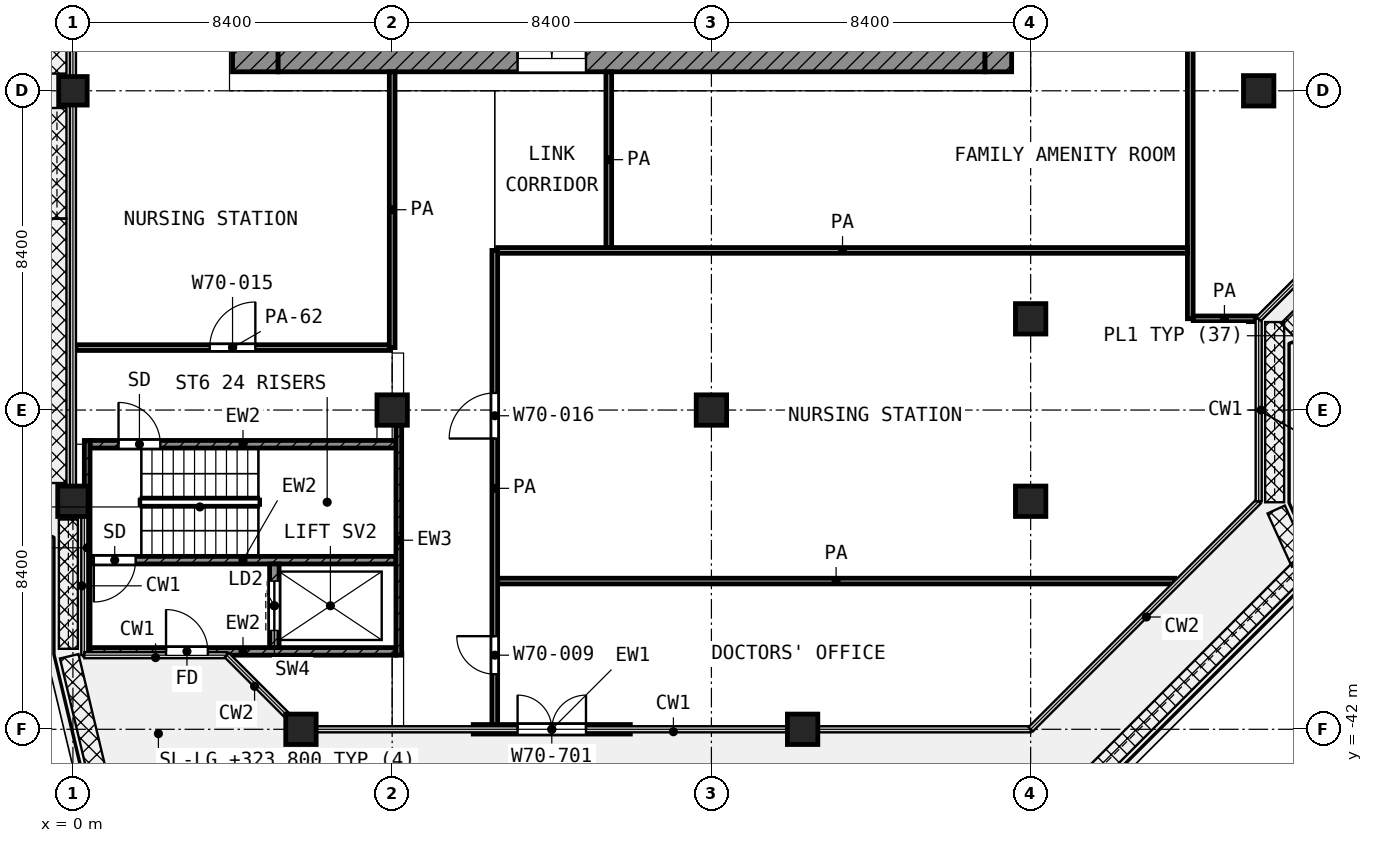
"""IFC4 building model, lengths in metres.
Left out: names, types, materials, properties, quantities, classifications, styles, units other than length and angle.
Written with IfcOpenShell. Run it as: python <this file> out.ifc"""

import sys

from ifc_helpers import new_model, si_unit, direction, frame, frame_2d, origin, origin_2d, place, context, subcontext, project, spatial, rectangle, extrude, element, fill, save


model = new_model("IFC4")
c1 = context("Model", 3, precision=1e-05, world=origin(), true_north=direction((0.0, 1.0)))
c2 = subcontext(c1, "Body", "Model", "MODEL_VIEW")
j1 = project(units=[si_unit("LENGTHUNIT", "METRE"), si_unit("PLANEANGLEUNIT", "RADIAN")], contexts=[c1])
p1 = place(None, origin())
s1 = spatial("IfcSite", under=j1, at=p1, CompositionType="ELEMENT")
p2 = place(p1, origin())
s2 = spatial("IfcBuilding", under=s1, at=p2, CompositionType="ELEMENT")
p3 = place(p2, frame((0.0, 0.0, 323.8)))
s3 = spatial("IfcBuildingStorey", under=s2, at=p3, CompositionType="ELEMENT", Elevation=323.8)
p4 = place(p3, frame((0.0, -25.2, 0.0), z_axis=(0.0, 0.0, 1.0), x_axis=(1.0, 0.0, 0.0)))
e1 = element("IfcColumn", 1, at=p4, inside=s3, PredefinedType="COLUMN", context=c2, shape_type="SweptSolid", body=[
    extrude(rectangle(XDim=0.75, YDim=0.75, at=origin_2d()), origin(), (0.0, 0.0, 1.0), 4.2),
])
for number, where, z_axis, x_axis in (
    (2, (31.2, -25.2, 0.0), (0.0, 0.0, 1.0), (1.0, 0.0, 0.0)),
    (3, (25.2, -31.2, 0.0), (0.0, 0.0, 1.0), (1.0, 0.0, 0.0)),
    (4, (8.4, -33.6, 0.0), (0.0, 0.0, 1.0), (1.0, 0.0, 0.0)),
    (5, (16.8, -33.6, 0.0), (0.0, 0.0, 1.0), (1.0, 0.0, 0.0)),
    (6, (0.0, -36.0, 0.0), (0.0, 0.0, 1.0), (1.0, 0.0, 0.0)),
    (7, (25.2, -36.0, 0.0), (0.0, 0.0, 1.0), (1.0, 0.0, 0.0)),
    (8, (6.0, -42.0, 0.0), (0.0, 0.0, 1.0), (1.0, 0.0, 0.0)),
    (9, (19.2, -42.0, 0.0), (0.0, 0.0, 1.0), (1.0, 0.0, 0.0)),
):
    element("IfcColumn", number, at=place(p3, frame(where, z_axis=z_axis, x_axis=x_axis)), inside=s3, PredefinedType="COLUMN", context=c2, shape_type="SweptSolid", body=[
        extrude(rectangle(XDim=0.8, YDim=0.8, at=origin_2d()), origin(), (0.0, 0.0, 1.0), 4.2),
    ])
p5 = place(p3, frame((10.533, -42.0, 0.0), z_axis=(0.0, 0.0, 1.0), x_axis=(1.0, 0.0, 0.0)))
e10 = element("IfcWall", 10, at=p5, inside=s3, PredefinedType="SOLIDWALL", context=c2, shape_type="SweptSolid", body=[
    extrude(rectangle(XDim=4.133, YDim=0.25, at=frame_2d((2.067, 0.0))), origin(), (0.0, 0.0, 1.0), 3.48),
])
p6 = place(p5, frame((1.167, 0.0, 0.0)))
e11 = element("IfcOpeningElement", 11, at=p6, cuts=e10, PredefinedType="OPENING", context=c2, shape_type="SweptSolid", body=[
    extrude(rectangle(XDim=1.8, YDim=2.1, at=frame_2d((0.9, 1.05))), frame((0.0, 0.135, 0.0), z_axis=(0.0, -1.0, 0.0), x_axis=(1.0, 0.0, 0.0)), (0.0, 0.0, 1.0), 0.27),
])
p7 = place(p3, frame((4.8, -24.7, 0.0), z_axis=(0.0, 0.0, 1.0), x_axis=(0.0, 1.0, 0.0)))
e12 = element("IfcWall", 12, at=p7, inside=s3, PredefinedType="SHEAR", context=c2, shape_type="SweptSolid", body=[
    extrude(rectangle(XDim=19.3, YDim=1.2, at=frame_2d((9.65, 0.0))), origin(), (0.0, 0.0, 1.0), 3.6),
])
p8 = place(p7, frame((11.15, 0.0, 0.0)))
e13 = element("IfcOpeningElement", 13, at=p8, cuts=e12, PredefinedType="OPENING", context=c2, shape_type="SweptSolid", body=[
    extrude(rectangle(XDim=1.1, YDim=2.1, at=frame_2d((0.55, 1.05))), frame((0.0, 0.61, 0.0), z_axis=(0.0, -1.0, 0.0), x_axis=(1.0, 0.0, 0.0)), (0.0, 0.0, 1.0), 1.22),
])
p9 = place(p7, frame((1.85, 0.0, 0.0)))
e14 = element("IfcOpeningElement", 14, at=p9, cuts=e12, PredefinedType="OPENING", context=c2, shape_type="SweptSolid", body=[
    extrude(rectangle(XDim=1.1, YDim=2.1, at=frame_2d((0.55, 1.05))), frame((0.0, 0.61, 0.0), z_axis=(0.0, -1.0, 0.0), x_axis=(1.0, 0.0, 0.0)), (0.0, 0.0, 1.0), 1.22),
])
p10 = place(p3, frame((5.4, -24.35, 0.0), z_axis=(0.0, 0.0, 1.0), x_axis=(1.0, 0.0, 0.0)))
e15 = element("IfcWall", 15, at=p10, inside=s3, PredefinedType="SHEAR", context=c2, shape_type="SweptSolid", body=[
    extrude(rectangle(XDim=18.6, YDim=0.7, at=frame_2d((9.3, 0.0))), origin(), (0.0, 0.0, 1.0), 3.6),
])
p11 = place(p10, frame((6.3, 0.0, 0.0)))
e16 = element("IfcOpeningElement", 16, at=p11, cuts=e15, PredefinedType="OPENING", context=c2, shape_type="SweptSolid", body=[
    extrude(rectangle(XDim=1.8, YDim=2.1, at=frame_2d((0.9, 1.05))), frame((0.0, 0.36, 0.0), z_axis=(0.0, -1.0, 0.0), x_axis=(1.0, 0.0, 0.0)), (0.0, 0.0, 1.0), 0.72),
])
p12 = place(p3, frame((24.35, -24.7, 0.0), z_axis=(0.0, 0.0, 1.0), x_axis=(0.0, 1.0, 0.0)))
e17 = element("IfcWall", 17, at=p12, inside=s3, PredefinedType="SHEAR", context=c2, shape_type="SweptSolid", body=[
    extrude(rectangle(XDim=0.7, YDim=0.7, at=frame_2d((0.35, 0.0))), origin(), (0.0, 0.0, 1.0), 3.6),
])
p13 = place(p3, frame((0.375, -40.05, 0.0), z_axis=(0.0, 0.0, 1.0), x_axis=(0.0, 1.0, 0.0)))
e18 = element("IfcWall", 18, at=p13, inside=s3, PredefinedType="SHEAR", context=c2, shape_type="SweptSolid", body=[
    extrude(rectangle(XDim=5.65, YDim=0.15, at=frame_2d((2.825, 0.0))), origin(), (0.0, 0.0, 1.0), 3.6),
])
p14 = place(p3, frame((8.575, -40.05, 0.0), z_axis=(0.0, 0.0, 1.0), x_axis=(0.0, 1.0, 0.0)))
e19 = element("IfcWall", 19, at=p14, inside=s3, PredefinedType="SHEAR", context=c2, shape_type="SweptSolid", body=[
    extrude(rectangle(XDim=6.05, YDim=0.15, at=frame_2d((3.025, 0.0))), origin(), (0.0, 0.0, 1.0), 3.6),
])
p15 = place(p3, frame((0.45, -34.5, 0.0), z_axis=(0.0, 0.0, 1.0), x_axis=(1.0, 0.0, 0.0)))
e20 = element("IfcWall", 20, at=p15, inside=s3, PredefinedType="SHEAR", context=c2, shape_type="SweptSolid", body=[
    extrude(rectangle(XDim=8.05, YDim=0.2, at=frame_2d((4.025, 0.0))), origin(), (0.0, 0.0, 1.0), 3.6),
])
p16 = place(p15, frame((0.75, 0.0, 0.0)))
e21 = element("IfcOpeningElement", 21, at=p16, cuts=e20, PredefinedType="OPENING", context=c2, shape_type="SweptSolid", body=[
    extrude(rectangle(XDim=1.1, YDim=2.1, at=frame_2d((0.55, 1.05))), frame((0.0, 0.11, 0.0), z_axis=(0.0, -1.0, 0.0), x_axis=(1.0, 0.0, 0.0)), (0.0, 0.0, 1.0), 0.22),
])
p17 = place(p3, frame((0.45, -37.55, 0.0), z_axis=(0.0, 0.0, 1.0), x_axis=(1.0, 0.0, 0.0)))
e22 = element("IfcWall", 22, at=p17, inside=s3, PredefinedType="SHEAR", context=c2, shape_type="SweptSolid", body=[
    extrude(rectangle(XDim=8.05, YDim=0.2, at=frame_2d((4.025, 0.0))), origin(), (0.0, 0.0, 1.0), 3.6),
])
p18 = place(p17, frame((0.1, 0.0, 0.0)))
e23 = element("IfcOpeningElement", 23, at=p18, cuts=e22, PredefinedType="OPENING", context=c2, shape_type="SweptSolid", body=[
    extrude(rectangle(XDim=1.1, YDim=2.1, at=frame_2d((0.55, 1.05))), frame((0.0, 0.11, 0.0), z_axis=(0.0, -1.0, 0.0), x_axis=(1.0, 0.0, 0.0)), (0.0, 0.0, 1.0), 0.22),
])
p19 = place(p3, frame((0.45, -39.95, 0.0), z_axis=(0.0, 0.0, 1.0), x_axis=(1.0, 0.0, 0.0)))
e24 = element("IfcWall", 24, at=p19, inside=s3, PredefinedType="SHEAR", context=c2, shape_type="SweptSolid", body=[
    extrude(rectangle(XDim=8.05, YDim=0.2, at=frame_2d((4.025, 0.0))), origin(), (0.0, 0.0, 1.0), 3.6),
])
p20 = place(p19, frame((2.0, 0.0, 0.0)))
e25 = element("IfcOpeningElement", 25, at=p20, cuts=e24, PredefinedType="OPENING", context=c2, shape_type="SweptSolid", body=[
    extrude(rectangle(XDim=1.1, YDim=2.1, at=frame_2d((0.55, 1.05))), frame((0.0, 0.11, 0.0), z_axis=(0.0, -1.0, 0.0), x_axis=(1.0, 0.0, 0.0)), (0.0, 0.0, 1.0), 0.22),
])
p21 = place(p3, frame((5.3, -39.85, 0.0), z_axis=(0.0, 0.0, 1.0), x_axis=(0.0, 1.0, 0.0)))
e26 = element("IfcWall", 26, at=p21, inside=s3, PredefinedType="SHEAR", context=c2, shape_type="SweptSolid", body=[
    extrude(rectangle(XDim=2.2, YDim=0.25, at=frame_2d((1.1, 0.0))), origin(), (0.0, 0.0, 1.0), 3.6),
])
p22 = place(p21, frame((0.45, 0.0, 0.0)))
e27 = element("IfcOpeningElement", 27, at=p22, cuts=e26, PredefinedType="OPENING", context=c2, shape_type="SweptSolid", body=[
    extrude(rectangle(XDim=1.3, YDim=2.1, at=frame_2d((0.65, 1.05))), frame((0.0, 0.135, 0.0), z_axis=(0.0, -1.0, 0.0), x_axis=(1.0, 0.0, 0.0)), (0.0, 0.0, 1.0), 0.27),
])
p23 = place(p3, frame((11.175, -38.1, 0.0), z_axis=(0.0, 0.0, 1.0), x_axis=(1.0, 0.0, 0.0)))
e28 = element("IfcWall", 28, at=p23, inside=s3, PredefinedType="PARTITIONING", context=c2, shape_type="SweptSolid", body=[
    extrude(rectangle(XDim=17.812, YDim=0.15, at=frame_2d((8.906, 0.0))), origin(), (0.0, 0.0, 1.0), 3.6),
])
p24 = place(p3, frame((0.08, -31.957, 0.0), z_axis=(0.0, 0.0, 1.0), x_axis=(1.0, 0.0, 0.0)))
e29 = element("IfcWall", 29, at=p24, inside=s3, PredefinedType="PARTITIONING", context=c2, shape_type="SweptSolid", body=[
    extrude(rectangle(XDim=8.245, YDim=0.15, at=frame_2d((4.123, 0.0))), origin(), (0.0, 0.0, 1.0), 2.7),
])
p25 = place(p24, frame((3.52, 0.0, 0.0)))
e30 = element("IfcOpeningElement", 30, at=p25, cuts=e29, PredefinedType="OPENING", context=c2, shape_type="SweptSolid", body=[
    extrude(rectangle(XDim=1.2, YDim=2.1, at=frame_2d((0.6, 1.05))), frame((0.0, 0.085, 0.0), z_axis=(0.0, -1.0, 0.0), x_axis=(1.0, 0.0, 0.0)), (0.0, 0.0, 1.0), 0.17),
])
p26 = place(p3, frame((29.477, -31.2, 0.0), z_axis=(0.0, 0.0, 1.0), x_axis=(1.0, 0.0, 0.0)))
e31 = element("IfcWall", 31, at=p26, inside=s3, PredefinedType="PARTITIONING", context=c2, shape_type="SweptSolid", body=[
    extrude(rectangle(XDim=1.643, YDim=0.15, at=frame_2d((0.822, 0.0))), origin(), (0.0, 0.0, 1.0), 3.6),
])
p27 = place(p3, frame((11.175, -29.4, 0.0), z_axis=(0.0, 0.0, 1.0), x_axis=(1.0, 0.0, 0.0)))
e32 = element("IfcWall", 32, at=p27, inside=s3, PredefinedType="PARTITIONING", context=c2, shape_type="SweptSolid", body=[
    extrude(rectangle(XDim=18.15, YDim=0.15, at=frame_2d((9.075, 0.0))), origin(), (0.0, 0.0, 1.0), 3.6),
])
p28 = place(p3, frame((8.4, -31.957, 0.0), z_axis=(0.0, 0.0, 1.0), x_axis=(0.0, 1.0, 0.0)))
e33 = element("IfcWall", 33, at=p28, inside=s3, PredefinedType="PARTITIONING", context=c2, shape_type="SweptSolid", body=[
    extrude(rectangle(XDim=7.257, YDim=0.15, at=frame_2d((3.628, 0.0))), origin(), (0.0, 0.0, 1.0), 3.6),
])
p29 = place(p3, frame((11.1, -41.92, 0.0), z_axis=(0.0, 0.0, 1.0), x_axis=(0.0, 1.0, 0.0)))
e34 = element("IfcWall", 34, at=p29, inside=s3, PredefinedType="PARTITIONING", context=c2, shape_type="SweptSolid", body=[
    extrude(rectangle(XDim=12.52, YDim=0.15, at=frame_2d((6.26, 0.0))), origin(), (0.0, 0.0, 1.0), 3.6),
])
p30 = place(p29, frame((7.57, 0.0, 0.0)))
e35 = element("IfcOpeningElement", 35, at=p30, cuts=e34, PredefinedType="OPENING", context=c2, shape_type="SweptSolid", body=[
    extrude(rectangle(XDim=1.2, YDim=2.1, at=frame_2d((0.6, 1.05))), frame((0.0, 0.085, 0.0), z_axis=(0.0, -1.0, 0.0), x_axis=(1.0, 0.0, 0.0)), (0.0, 0.0, 1.0), 0.17),
])
p31 = place(p29, frame((1.37, 0.0, 0.0)))
e36 = element("IfcOpeningElement", 36, at=p31, cuts=e34, PredefinedType="OPENING", context=c2, shape_type="SweptSolid", body=[
    extrude(rectangle(XDim=1.0, YDim=2.1, at=frame_2d((0.5, 1.05))), frame((0.0, 0.085, 0.0), z_axis=(0.0, -1.0, 0.0), x_axis=(1.0, 0.0, 0.0)), (0.0, 0.0, 1.0), 0.17),
])
p32 = place(p3, frame((14.1, -29.325, 0.0), z_axis=(0.0, 0.0, 1.0), x_axis=(0.0, 1.0, 0.0)))
e37 = element("IfcWall", 37, at=p32, inside=s3, PredefinedType="PARTITIONING", context=c2, shape_type="SweptSolid", body=[
    extrude(rectangle(XDim=4.625, YDim=0.15, at=frame_2d((2.312, 0.0))), origin(), (0.0, 0.0, 1.0), 3.6),
])
p33 = place(p3, frame((29.4, -31.198, 0.0), z_axis=(0.0, 0.0, 1.0), x_axis=(0.0, 1.0, 0.0)))
e38 = element("IfcWall", 38, at=p33, inside=s3, PredefinedType="PARTITIONING", context=c2, shape_type="SweptSolid", body=[
    extrude(rectangle(XDim=20.098, YDim=0.15, at=frame_2d((10.049, 0.0))), origin(), (0.0, 0.0, 1.0), 3.6),
])
p34 = place(p6, origin())
e39 = element("IfcDoor", 39, at=p34, inside=s3, OperationType="DOUBLE_DOOR_SINGLE_SWING", PredefinedType="DOOR", context=c2, shape_type="SweptSolid", body=[
    extrude(rectangle(XDim=1.8, YDim=2.1, at=frame_2d((0.9, 1.05))), frame((0.0, 0.025, 0.0), z_axis=(0.0, -1.0, 0.0), x_axis=(1.0, 0.0, 0.0)), (0.0, 0.0, 1.0), 0.05),
])
fill(e11, e39)
p35 = place(p11, origin())
e40 = element("IfcDoor", 40, at=p35, inside=s3, OperationType="DOUBLE_DOOR_SINGLE_SWING", PredefinedType="DOOR", context=c2, shape_type="SweptSolid", body=[
    extrude(rectangle(XDim=1.8, YDim=2.1, at=frame_2d((0.9, 1.05))), frame((0.0, 0.025, 0.0), z_axis=(0.0, -1.0, 0.0), x_axis=(1.0, 0.0, 0.0)), (0.0, 0.0, 1.0), 0.05),
])
fill(e16, e40)
p36 = place(p16, origin())
e41 = element("IfcDoor", 41, at=p36, inside=s3, OperationType="SINGLE_SWING_LEFT", PredefinedType="DOOR", context=c2, shape_type="SweptSolid", body=[
    extrude(rectangle(XDim=1.1, YDim=2.1, at=frame_2d((0.55, 1.05))), frame((0.0, 0.025, 0.0), z_axis=(0.0, -1.0, 0.0), x_axis=(1.0, 0.0, 0.0)), (0.0, 0.0, 1.0), 0.05),
])
fill(e21, e41)
p37 = place(p18, frame((1.1, 0.0, 0.0), z_axis=(0.0, 0.0, 1.0), x_axis=(-1.0, 0.0, 0.0)))
e42 = element("IfcDoor", 42, at=p37, inside=s3, OperationType="SINGLE_SWING_LEFT", PredefinedType="DOOR", context=c2, shape_type="SweptSolid", body=[
    extrude(rectangle(XDim=1.1, YDim=2.1, at=frame_2d((0.55, 1.05))), frame((0.0, 0.025, 0.0), z_axis=(0.0, -1.0, 0.0), x_axis=(1.0, 0.0, 0.0)), (0.0, 0.0, 1.0), 0.05),
])
fill(e23, e42)
p38 = place(p22, origin())
e43 = element("IfcDoor", 43, at=p38, inside=s3, OperationType="DOUBLE_DOOR_SLIDING", PredefinedType="DOOR", context=c2, shape_type="SweptSolid", body=[
    extrude(rectangle(XDim=1.3, YDim=2.1, at=frame_2d((0.65, 1.05))), frame((0.0, 0.025, 0.0), z_axis=(0.0, -1.0, 0.0), x_axis=(1.0, 0.0, 0.0)), (0.0, 0.0, 1.0), 0.05),
])
fill(e27, e43)
p39 = place(p20, origin())
e44 = element("IfcDoor", 44, at=p39, inside=s3, OperationType="SINGLE_SWING_LEFT", PredefinedType="DOOR", context=c2, shape_type="SweptSolid", body=[
    extrude(rectangle(XDim=1.1, YDim=2.1, at=frame_2d((0.55, 1.05))), frame((0.0, 0.025, 0.0), z_axis=(0.0, -1.0, 0.0), x_axis=(1.0, 0.0, 0.0)), (0.0, 0.0, 1.0), 0.05),
])
fill(e25, e44)
p40 = place(p25, origin())
e45 = element("IfcDoor", 45, at=p40, inside=s3, OperationType="SINGLE_SWING_RIGHT", PredefinedType="DOOR", context=c2, shape_type="SweptSolid", body=[
    extrude(rectangle(XDim=1.2, YDim=2.1, at=frame_2d((0.6, 1.05))), frame((0.0, 0.025, 0.0), z_axis=(0.0, -1.0, 0.0), x_axis=(1.0, 0.0, 0.0)), (0.0, 0.0, 1.0), 0.05),
])
fill(e30, e45)
p41 = place(p30, origin())
e46 = element("IfcDoor", 46, at=p41, inside=s3, OperationType="SINGLE_SWING_LEFT", PredefinedType="DOOR", context=c2, shape_type="SweptSolid", body=[
    extrude(rectangle(XDim=1.2, YDim=2.1, at=frame_2d((0.6, 1.05))), frame((0.0, 0.025, 0.0), z_axis=(0.0, -1.0, 0.0), x_axis=(1.0, 0.0, 0.0)), (0.0, 0.0, 1.0), 0.05),
])
fill(e35, e46)
p42 = place(p31, origin())
e47 = element("IfcDoor", 47, at=p42, inside=s3, OperationType="SINGLE_SWING_RIGHT", PredefinedType="DOOR", context=c2, shape_type="SweptSolid", body=[
    extrude(rectangle(XDim=1.0, YDim=2.1, at=frame_2d((0.5, 1.05))), frame((0.0, 0.025, 0.0), z_axis=(0.0, -1.0, 0.0), x_axis=(1.0, 0.0, 0.0)), (0.0, 0.0, 1.0), 0.05),
])
fill(e36, e47)
save(model, sys.argv[1])
